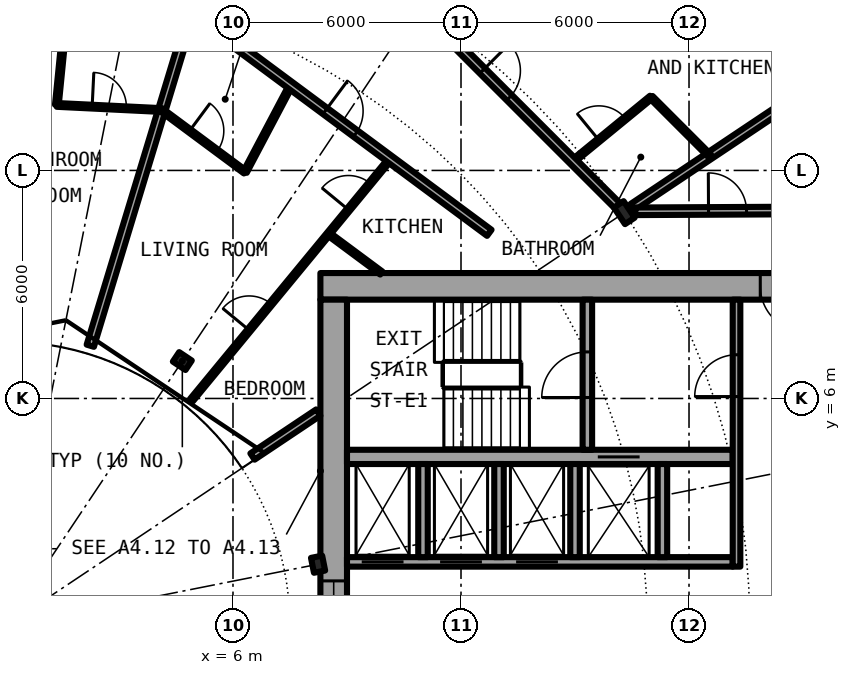
"""IFC4 building model, lengths in metres.
Left out: names, types, materials, properties, quantities, classifications, styles, units other than length and angle.
Written with IfcOpenShell. Run it as: python <this file> out.ifc"""

import sys

from ifc_helpers import new_model, si_unit, direction, frame, frame_2d, origin, origin_2d, place, context, subcontext, project, spatial, rectangle, i_section, extrude, element, fill, save


model = new_model("IFC4")
c1 = context("Model", 3, precision=1e-05, world=origin(), true_north=direction((0.0, 1.0)))
c2 = subcontext(c1, "Body", "Model", "MODEL_VIEW")
j1 = project(units=[si_unit("LENGTHUNIT", "METRE"), si_unit("PLANEANGLEUNIT", "RADIAN")], contexts=[c1])
p1 = place(None, origin())
s1 = spatial("IfcSite", under=j1, at=p1, CompositionType="ELEMENT")
p2 = place(p1, origin())
s2 = spatial("IfcBuilding", under=s1, at=p2, CompositionType="ELEMENT")
p3 = place(p2, frame((0.0, 0.0, 63.6)))
s3 = spatial("IfcBuildingStorey", under=s2, at=p3, CompositionType="ELEMENT", Elevation=63.6)
p4 = place(p3, frame((16.297, 10.889, 0.0), z_axis=(0.0, 0.0, 1.0), x_axis=(0.831469612303, 0.55557023302, 0.0)))
e1 = element("IfcColumn", 1, at=p4, inside=s3, PredefinedType="COLUMN", context=c2, shape_type="SweptSolid", body=[
    extrude(i_section(OverallWidth=0.306, OverallDepth=0.524, WebThickness=0.021, FlangeThickness=0.04, FilletRadius=0.027, at=origin_2d()), origin(), (0.0, 0.0, 1.0), 3.05),
])
for number, where, z_axis, x_axis in (
    (2, (8.239, 1.639, 0.0), (0.0, 0.0, 1.0), (0.981, 0.195, 0.0)),
    (3, (4.667, 6.984, 0.0), (0.0, 0.0, 1.0), (0.556, 0.831, 0.0)),
):
    element("IfcColumn", number, at=place(p3, frame(where, z_axis=z_axis, x_axis=x_axis)), inside=s3, PredefinedType="COLUMN", context=c2, shape_type="SweptSolid", body=[
        extrude(i_section(OverallWidth=0.3, OverallDepth=0.4, WebThickness=0.013, FlangeThickness=0.024, FilletRadius=0.027, at=origin_2d()), origin(), (0.0, 0.0, 1.0), 3.05),
    ])
p5 = place(p3, frame((22.699, 15.167, 0.0), z_axis=(0.0, 0.0, 1.0), x_axis=(-0.634382322723, 0.773019449054, 0.0)))
e4 = element("IfcWall", 4, at=p5, inside=s3, PredefinedType="SOLIDWALL", context=c2, shape_type="SweptSolid", body=[
    extrude(rectangle(XDim=5.352, YDim=0.25, at=frame_2d((2.676, 0.0))), origin(), (0.0, 0.0, 1.0), 2.7),
])
p6 = place(p5, frame((0.841, 0.0, 0.0)))
e5 = element("IfcOpeningElement", 5, at=p6, cuts=e4, PredefinedType="OPENING", context=c2, shape_type="SweptSolid", body=[
    extrude(rectangle(XDim=1.0, YDim=2.2, at=frame_2d((0.5, 1.1))), frame((0.0, 0.135, 0.0), z_axis=(0.0, -1.0, 0.0), x_axis=(1.0, 0.0, 0.0)), (0.0, 0.0, 1.0), 0.27),
])
p7 = place(p5, frame((3.111, 0.0, 0.3)))
e6 = element("IfcOpeningElement", 6, at=p7, cuts=e4, PredefinedType="OPENING", context=c2, shape_type="SweptSolid", body=[
    extrude(rectangle(XDim=1.8, YDim=2.1, at=frame_2d((0.9, 1.05))), frame((0.0, 0.135, 0.0), z_axis=(0.0, -1.0, 0.0), x_axis=(1.0, 0.0, 0.0)), (0.0, 0.0, 1.0), 0.27),
])
p8 = place(p3, frame((22.3, 8.95, 0.0), z_axis=(0.0, 0.0, 1.0), x_axis=(-1.0, 0.0, 0.0)))
e7 = element("IfcWall", 7, at=p8, inside=s3, PredefinedType="SHEAR", context=c2, shape_type="SweptSolid", body=[
    extrude(rectangle(XDim=14.0, YDim=0.7, at=frame_2d((7.0, 0.0))), origin(), (0.0, 0.0, 1.0), 3.05),
])
p9 = place(p8, frame((1.225, 0.0, 0.0)))
e8 = element("IfcOpeningElement", 8, at=p9, cuts=e7, PredefinedType="OPENING", context=c2, shape_type="SweptSolid", body=[
    extrude(rectangle(XDim=1.2, YDim=2.3, at=frame_2d((0.6, 1.15))), frame((0.0, 0.36, 0.0), z_axis=(0.0, -1.0, 0.0), x_axis=(1.0, 0.0, 0.0)), (0.0, 0.0, 1.0), 0.72),
])
p10 = place(p3, frame((8.65, -8.6, 0.0), z_axis=(0.0, 0.0, 1.0), x_axis=(0.0, 1.0, 0.0)))
e9 = element("IfcWall", 9, at=p10, inside=s3, PredefinedType="SHEAR", context=c2, shape_type="SweptSolid", body=[
    extrude(rectangle(XDim=17.2, YDim=0.7, at=frame_2d((8.6, 0.0))), origin(), (0.0, 0.0, 1.0), 3.05),
])
p11 = place(p10, frame((7.4, 0.0, 0.1)))
e10 = element("IfcOpeningElement", 10, at=p11, cuts=e9, PredefinedType="OPENING", context=c2, shape_type="SweptSolid", body=[
    extrude(rectangle(XDim=2.4, YDim=2.2, at=frame_2d((1.2, 1.1))), frame((0.0, 0.36, 0.0), z_axis=(0.0, -1.0, 0.0), x_axis=(1.0, 0.0, 0.0)), (0.0, 0.0, 1.0), 0.72),
])
p12 = place(p3, frame((9.0, 1.7, 0.0), z_axis=(0.0, 0.0, 1.0), x_axis=(1.0, 0.0, 0.0)))
e11 = element("IfcWall", 11, at=p12, inside=s3, PredefinedType="SHEAR", context=c2, shape_type="SweptSolid", body=[
    extrude(rectangle(XDim=10.15, YDim=0.25, at=frame_2d((5.075, 0.0))), origin(), (0.0, 0.0, 1.0), 3.05),
])
p13 = place(p12, frame((0.387, 0.0, 0.0)))
e12 = element("IfcOpeningElement", 12, at=p13, cuts=e11, PredefinedType="OPENING", context=c2, shape_type="SweptSolid", body=[
    extrude(rectangle(XDim=1.1, YDim=2.3, at=frame_2d((0.55, 1.15))), frame((0.0, 0.135, 0.0), z_axis=(0.0, -1.0, 0.0), x_axis=(1.0, 0.0, 0.0)), (0.0, 0.0, 1.0), 0.27),
])
p14 = place(p12, frame((2.45, 0.0, 0.0)))
e13 = element("IfcOpeningElement", 13, at=p14, cuts=e11, PredefinedType="OPENING", context=c2, shape_type="SweptSolid", body=[
    extrude(rectangle(XDim=1.1, YDim=2.3, at=frame_2d((0.55, 1.15))), frame((0.0, 0.135, 0.0), z_axis=(0.0, -1.0, 0.0), x_axis=(1.0, 0.0, 0.0)), (0.0, 0.0, 1.0), 0.27),
])
p15 = place(p12, frame((4.45, 0.0, 0.0)))
e14 = element("IfcOpeningElement", 14, at=p15, cuts=e11, PredefinedType="OPENING", context=c2, shape_type="SweptSolid", body=[
    extrude(rectangle(XDim=1.1, YDim=2.3, at=frame_2d((0.55, 1.15))), frame((0.0, 0.135, 0.0), z_axis=(0.0, -1.0, 0.0), x_axis=(1.0, 0.0, 0.0)), (0.0, 0.0, 1.0), 0.27),
])
p16 = place(p3, frame((9.0, 4.462, 0.0), z_axis=(0.0, 0.0, 1.0), x_axis=(1.0, 0.0, 0.0)))
e15 = element("IfcWall", 15, at=p16, inside=s3, PredefinedType="SHEAR", context=c2, shape_type="SweptSolid", body=[
    extrude(rectangle(XDim=10.15, YDim=0.375, at=frame_2d((5.075, 0.0))), origin(), (0.0, 0.0, 1.0), 3.05),
])
p17 = place(p16, frame((6.6, 0.0, 0.0)))
e16 = element("IfcOpeningElement", 16, at=p17, cuts=e15, PredefinedType="OPENING", context=c2, shape_type="SweptSolid", body=[
    extrude(rectangle(XDim=1.1, YDim=2.3, at=frame_2d((0.55, 1.15))), frame((0.0, 0.198, 0.0), z_axis=(0.0, -1.0, 0.0), x_axis=(1.0, 0.0, 0.0)), (0.0, 0.0, 1.0), 0.395),
])
p18 = place(p3, frame((15.325, 4.65, 0.0), z_axis=(0.0, 0.0, 1.0), x_axis=(0.0, 1.0, 0.0)))
e17 = element("IfcWall", 17, at=p18, inside=s3, PredefinedType="SHEAR", context=c2, shape_type="SweptSolid", body=[
    extrude(rectangle(XDim=3.95, YDim=0.25, at=frame_2d((1.975, 0.0))), origin(), (0.0, 0.0, 1.0), 3.05),
])
p19 = place(p18, frame((1.375, 0.0, 0.0)))
e18 = element("IfcOpeningElement", 18, at=p19, cuts=e17, PredefinedType="OPENING", context=c2, shape_type="SweptSolid", body=[
    extrude(rectangle(XDim=1.2, YDim=2.3, at=frame_2d((0.6, 1.15))), frame((0.0, 0.135, 0.0), z_axis=(0.0, -1.0, 0.0), x_axis=(1.0, 0.0, 0.0)), (0.0, 0.0, 1.0), 0.27),
])
for number, where, z_axis, x_axis in (
    (19, (15.0, 1.825, 0.0), (0.0, 0.0, 1.0), (0.0, 1.0, 0.0)),
    (20, (17.3, 1.825, 0.0), (0.0, 0.0, 1.0), (0.0, 1.0, 0.0)),
):
    element("IfcWall", number, at=place(p3, frame(where, z_axis=z_axis, x_axis=x_axis)), inside=s3, PredefinedType="SOLIDWALL", context=c2, shape_type="SweptSolid", body=[
        extrude(rectangle(XDim=2.45, YDim=0.25, at=frame_2d((1.225, 0.0))), origin(), (0.0, 0.0, 1.0), 2.7),
    ])
p20 = place(p3, frame((19.25, 1.575, 0.0), z_axis=(0.0, 0.0, 1.0), x_axis=(0.0, 1.0, 0.0)))
e21 = element("IfcWall", 21, at=p20, inside=s3, PredefinedType="SOLIDWALL", context=c2, shape_type="SweptSolid", body=[
    extrude(rectangle(XDim=7.025, YDim=0.2, at=frame_2d((3.513, 0.0))), origin(), (0.0, 0.0, 1.0), 2.7),
])
p21 = place(p20, frame((4.475, 0.0, 0.0)))
e22 = element("IfcOpeningElement", 22, at=p21, cuts=e21, PredefinedType="OPENING", context=c2, shape_type="SweptSolid", body=[
    extrude(rectangle(XDim=1.1, YDim=2.3, at=frame_2d((0.55, 1.15))), frame((0.0, 0.11, 0.0), z_axis=(0.0, -1.0, 0.0), x_axis=(1.0, 0.0, 0.0)), (0.0, 0.0, 1.0), 0.22),
])
for number, where, z_axis, x_axis in (
    (23, (11.0, 1.825, 0.0), (0.0, 0.0, 1.0), (0.0, 1.0, 0.0)),
    (24, (13.0, 1.825, 0.0), (0.0, 0.0, 1.0), (0.0, 1.0, 0.0)),
):
    element("IfcWall", number, at=place(p3, frame(where, z_axis=z_axis, x_axis=x_axis)), inside=s3, PredefinedType="SOLIDWALL", context=c2, shape_type="SweptSolid", body=[
        extrude(rectangle(XDim=2.45, YDim=0.25, at=frame_2d((1.225, 0.0))), origin(), (0.0, 0.0, 1.0), 2.7),
    ])
p22 = place(p3, frame((1.365, 13.724, 0.0), z_axis=(0.0, 0.0, 1.0), x_axis=(0.099171803948, 0.995070325807, 0.0)))
e25 = element("IfcWall", 25, at=p22, inside=s3, PredefinedType="PARTITIONING", context=c2, shape_type="SweptSolid", body=[
    extrude(rectangle(XDim=2.622, YDim=0.1, at=frame_2d((1.311, 0.0))), origin(), (0.0, 0.0, 1.0), 2.7),
])
p23 = place(p3, frame((2.245, 7.387, 0.0), z_axis=(0.0, 0.0, 1.0), x_axis=(0.290403763195, 0.956904203315, 0.0)))
e26 = element("IfcWall", 26, at=p23, inside=s3, PredefinedType="PARTITIONING", context=c2, shape_type="SweptSolid", body=[
    extrude(rectangle(XDim=9.179, YDim=0.2, at=frame_2d((4.59, 0.0))), origin(), (0.0, 0.0, 1.0), 2.7),
])
p24 = place(p3, frame((4.909, 5.958, 0.0), z_axis=(0.0, 0.0, 1.0), x_axis=(0.635976043025, 0.771708800454, 0.0)))
e27 = element("IfcWall", 27, at=p24, inside=s3, PredefinedType="PARTITIONING", context=c2, shape_type="SweptSolid", body=[
    extrude(rectangle(XDim=8.213, YDim=0.1, at=frame_2d((4.106, 0.0))), origin(), (0.0, 0.0, 1.0), 2.7),
])
p25 = place(p24, frame((6.49, 0.0, 0.0)))
e28 = element("IfcOpeningElement", 28, at=p25, cuts=e27, PredefinedType="OPENING", context=c2, shape_type="SweptSolid", body=[
    extrude(rectangle(XDim=0.9, YDim=2.3, at=frame_2d((0.45, 1.15))), frame((0.0, 0.06, 0.0), z_axis=(0.0, -1.0, 0.0), x_axis=(1.0, 0.0, 0.0)), (0.0, 0.0, 1.0), 0.12),
])
p26 = place(p24, frame((2.384, 0.0, 0.0)))
e29 = element("IfcOpeningElement", 29, at=p26, cuts=e27, PredefinedType="OPENING", context=c2, shape_type="SweptSolid", body=[
    extrude(rectangle(XDim=0.9, YDim=2.3, at=frame_2d((0.45, 1.15))), frame((0.0, 0.06, 0.0), z_axis=(0.0, -1.0, 0.0), x_axis=(1.0, 0.0, 0.0)), (0.0, 0.0, 1.0), 0.12),
])
p27 = place(p3, frame((6.318, 11.96, 0.0), z_axis=(0.0, 0.0, 1.0), x_axis=(0.467001992543, 0.884256263173, 0.0)))
e30 = element("IfcWall", 30, at=p27, inside=s3, PredefinedType="PARTITIONING", context=c2, shape_type="SweptSolid", body=[
    extrude(rectangle(XDim=2.572, YDim=0.1, at=frame_2d((1.286, 0.0))), origin(), (0.0, 0.0, 1.0), 2.7),
])
p28 = place(p3, frame((14.945, 12.241, 0.0), z_axis=(0.0, 0.0, 1.0), x_axis=(0.77367517848, 0.633582447834, 0.0)))
e31 = element("IfcWall", 31, at=p28, inside=s3, PredefinedType="PARTITIONING", context=c2, shape_type="SweptSolid", body=[
    extrude(rectangle(XDim=2.661, YDim=0.1, at=frame_2d((1.331, 0.0))), origin(), (0.0, 0.0, 1.0), 2.7),
])
p29 = place(p28, frame((0.881, 0.0, 0.0)))
e32 = element("IfcOpeningElement", 32, at=p29, cuts=e31, PredefinedType="OPENING", context=c2, shape_type="SweptSolid", body=[
    extrude(rectangle(XDim=0.9, YDim=2.3, at=frame_2d((0.45, 1.15))), frame((0.0, 0.06, 0.0), z_axis=(0.0, -1.0, 0.0), x_axis=(1.0, 0.0, 0.0)), (0.0, 0.0, 1.0), 0.12),
])
p30 = place(p3, frame((16.515, 11.034, 0.0), z_axis=(0.0, 0.0, 1.0), x_axis=(0.831382022135, 0.555701298605, 0.0)))
e33 = element("IfcWall", 33, at=p30, inside=s3, PredefinedType="PARTITIONING", context=c2, shape_type="SweptSolid", body=[
    extrude(rectangle(XDim=7.313, YDim=0.2, at=frame_2d((3.657, 0.0))), origin(), (0.0, 0.0, 1.0), 2.7),
])
p31 = place(p3, frame((6.513, 4.472, 0.0), z_axis=(0.0, 0.0, 1.0), x_axis=(0.831382204863, 0.555701025225, 0.0)))
e34 = element("IfcWall", 34, at=p31, inside=s3, PredefinedType="PARTITIONING", context=c2, shape_type="SweptSolid", body=[
    extrude(rectangle(XDim=2.082, YDim=0.2, at=frame_2d((1.041, 0.0))), origin(), (0.0, 0.0, 1.0), 2.7),
])
p32 = place(p3, frame((16.588, 10.925, 0.0), z_axis=(0.0, 0.0, 1.0), x_axis=(0.999988019025, 0.004895079807, 0.0)))
e35 = element("IfcWall", 35, at=p32, inside=s3, PredefinedType="PARTITIONING", context=c2, shape_type="SweptSolid", body=[
    extrude(rectangle(XDim=5.087, YDim=0.2, at=frame_2d((2.543, 0.0))), origin(), (0.0, 0.0, 1.0), 2.7),
])
p33 = place(p32, frame((1.925, 0.0, 0.0)))
e36 = element("IfcOpeningElement", 36, at=p33, cuts=e35, PredefinedType="OPENING", context=c2, shape_type="SweptSolid", body=[
    extrude(rectangle(XDim=1.0, YDim=2.3, at=frame_2d((0.5, 1.15))), frame((0.0, 0.11, 0.0), z_axis=(0.0, -1.0, 0.0), x_axis=(1.0, 0.0, 0.0)), (0.0, 0.0, 1.0), 0.22),
])
p34 = place(p3, frame((4.122, 13.589, 0.0), z_axis=(0.0, 0.0, 1.0), x_axis=(0.803128348509, -0.595806055542, 0.0)))
e37 = element("IfcWall", 37, at=p34, inside=s3, PredefinedType="PARTITIONING", context=c2, shape_type="SweptSolid", body=[
    extrude(rectangle(XDim=2.734, YDim=0.1, at=frame_2d((1.367, 0.0))), origin(), (0.0, 0.0, 1.0), 2.7),
])
p35 = place(p34, frame((0.917, 0.0, 0.0)))
e38 = element("IfcOpeningElement", 38, at=p35, cuts=e37, PredefinedType="OPENING", context=c2, shape_type="SweptSolid", body=[
    extrude(rectangle(XDim=0.9, YDim=2.3, at=frame_2d((0.45, 1.15))), frame((0.0, 0.06, 0.0), z_axis=(0.0, -1.0, 0.0), x_axis=(1.0, 0.0, 0.0)), (0.0, 0.0, 1.0), 0.12),
])
p36 = place(p3, frame((8.512, 10.332, 0.0), z_axis=(0.0, 0.0, 1.0), x_axis=(0.803135014325, -0.595797070121, 0.0)))
e39 = element("IfcWall", 39, at=p36, inside=s3, PredefinedType="PARTITIONING", context=c2, shape_type="SweptSolid", body=[
    extrude(rectangle(XDim=1.732, YDim=0.1, at=frame_2d((0.866, 0.0))), origin(), (0.0, 0.0, 1.0), 2.7),
])
p37 = place(p3, frame((1.365, 13.724, 0.0), z_axis=(0.0, 0.0, 1.0), x_axis=(0.99880320044, -0.048909782152, 0.0)))
e40 = element("IfcWall", 40, at=p37, inside=s3, PredefinedType="PARTITIONING", context=c2, shape_type="SweptSolid", body=[
    extrude(rectangle(XDim=2.76, YDim=0.1, at=frame_2d((1.38, 0.0))), origin(), (0.0, 0.0, 1.0), 2.7),
])
p38 = place(p37, frame((0.93, 0.0, 0.0)))
e41 = element("IfcOpeningElement", 41, at=p38, cuts=e40, PredefinedType="OPENING", context=c2, shape_type="SweptSolid", body=[
    extrude(rectangle(XDim=0.9, YDim=2.3, at=frame_2d((0.45, 1.15))), frame((0.0, 0.06, 0.0), z_axis=(0.0, -1.0, 0.0), x_axis=(1.0, 0.0, 0.0)), (0.0, 0.0, 1.0), 0.12),
])
p39 = place(p3, frame((4.906, 16.172, 0.0), z_axis=(0.0, 0.0, 1.0), x_axis=(0.803191461888, -0.595720971219, 0.0)))
e42 = element("IfcWall", 42, at=p39, inside=s3, PredefinedType="PARTITIONING", context=c2, shape_type="SweptSolid", body=[
    extrude(rectangle(XDim=9.76, YDim=0.2, at=frame_2d((4.88, 0.0))), origin(), (0.0, 0.0, 1.0), 2.7),
])
p40 = place(p39, frame((4.38, 0.0, 0.0)))
e43 = element("IfcOpeningElement", 43, at=p40, cuts=e42, PredefinedType="OPENING", context=c2, shape_type="SweptSolid", body=[
    extrude(rectangle(XDim=1.0, YDim=2.3, at=frame_2d((0.5, 1.15))), frame((0.0, 0.11, 0.0), z_axis=(0.0, -1.0, 0.0), x_axis=(1.0, 0.0, 0.0)), (0.0, 0.0, 1.0), 0.22),
])
p41 = place(p3, frame((11.0, 16.186, 0.0), z_axis=(0.0, 0.0, 1.0), x_axis=(0.707106781187, -0.707106781187, 0.0)))
e44 = element("IfcWall", 44, at=p41, inside=s3, PredefinedType="PARTITIONING", context=c2, shape_type="SweptSolid", body=[
    extrude(rectangle(XDim=7.334, YDim=0.2, at=frame_2d((3.667, 0.0))), origin(), (0.0, 0.0, 1.0), 2.38),
])
p42 = place(p41, frame((2.211, 0.0, 0.0)))
e45 = element("IfcOpeningElement", 45, at=p42, cuts=e44, PredefinedType="OPENING", context=c2, shape_type="SweptSolid", body=[
    extrude(rectangle(XDim=1.0, YDim=2.3, at=frame_2d((0.5, 1.15))), frame((0.0, 0.11, 0.0), z_axis=(0.0, -1.0, 0.0), x_axis=(1.0, 0.0, 0.0)), (0.0, 0.0, 1.0), 0.22),
])
p43 = place(p3, frame((17.006, 13.924, 0.0), z_axis=(0.0, 0.0, 1.0), x_axis=(0.706826194425, -0.707387256653, 0.0)))
e46 = element("IfcWall", 46, at=p43, inside=s3, PredefinedType="PARTITIONING", context=c2, shape_type="SweptSolid", body=[
    extrude(rectangle(XDim=2.176, YDim=0.1, at=frame_2d((1.088, 0.0))), origin(), (0.0, 0.0, 1.0), 2.7),
])
p44 = place(p13, origin())
e47 = element("IfcDoor", 47, at=p44, inside=s3, OperationType="DOUBLE_DOOR_SLIDING", PredefinedType="DOOR", context=c2, shape_type="SweptSolid", body=[
    extrude(rectangle(XDim=1.1, YDim=2.3, at=frame_2d((0.55, 1.15))), frame((0.0, 0.025, 0.0), z_axis=(0.0, -1.0, 0.0), x_axis=(1.0, 0.0, 0.0)), (0.0, 0.0, 1.0), 0.05),
])
fill(e12, e47)
p45 = place(p14, origin())
e48 = element("IfcDoor", 48, at=p45, inside=s3, OperationType="DOUBLE_DOOR_SLIDING", PredefinedType="DOOR", context=c2, shape_type="SweptSolid", body=[
    extrude(rectangle(XDim=1.1, YDim=2.3, at=frame_2d((0.55, 1.15))), frame((0.0, 0.025, 0.0), z_axis=(0.0, -1.0, 0.0), x_axis=(1.0, 0.0, 0.0)), (0.0, 0.0, 1.0), 0.05),
])
fill(e13, e48)
p46 = place(p15, origin())
e49 = element("IfcDoor", 49, at=p46, inside=s3, OperationType="DOUBLE_DOOR_SLIDING", PredefinedType="DOOR", context=c2, shape_type="SweptSolid", body=[
    extrude(rectangle(XDim=1.1, YDim=2.3, at=frame_2d((0.55, 1.15))), frame((0.0, 0.025, 0.0), z_axis=(0.0, -1.0, 0.0), x_axis=(1.0, 0.0, 0.0)), (0.0, 0.0, 1.0), 0.05),
])
fill(e14, e49)
p47 = place(p17, origin())
e50 = element("IfcDoor", 50, at=p47, inside=s3, OperationType="DOUBLE_DOOR_SLIDING", PredefinedType="DOOR", context=c2, shape_type="SweptSolid", body=[
    extrude(rectangle(XDim=1.1, YDim=2.3, at=frame_2d((0.55, 1.15))), frame((0.0, 0.025, 0.0), z_axis=(0.0, -1.0, 0.0), x_axis=(1.0, 0.0, 0.0)), (0.0, 0.0, 1.0), 0.05),
])
fill(e16, e50)
p48 = place(p19, origin())
e51 = element("IfcDoor", 51, at=p48, inside=s3, OperationType="SINGLE_SWING_LEFT", PredefinedType="DOOR", context=c2, shape_type="SweptSolid", body=[
    extrude(rectangle(XDim=1.2, YDim=2.3, at=frame_2d((0.6, 1.15))), frame((0.0, 0.025, 0.0), z_axis=(0.0, -1.0, 0.0), x_axis=(1.0, 0.0, 0.0)), (0.0, 0.0, 1.0), 0.05),
])
fill(e18, e51)
p49 = place(p21, origin())
e52 = element("IfcDoor", 52, at=p49, inside=s3, OperationType="SINGLE_SWING_LEFT", PredefinedType="DOOR", context=c2, shape_type="SweptSolid", body=[
    extrude(rectangle(XDim=1.1, YDim=2.3, at=frame_2d((0.55, 1.15))), frame((0.0, 0.025, 0.0), z_axis=(0.0, -1.0, 0.0), x_axis=(1.0, 0.0, 0.0)), (0.0, 0.0, 1.0), 0.05),
])
fill(e22, e52)
p50 = place(p9, origin())
e53 = element("IfcDoor", 53, at=p50, inside=s3, OperationType="SINGLE_SWING_RIGHT", PredefinedType="DOOR", context=c2, shape_type="SweptSolid", body=[
    extrude(rectangle(XDim=1.2, YDim=2.3, at=frame_2d((0.6, 1.15))), frame((0.0, 0.025, 0.0), z_axis=(0.0, -1.0, 0.0), x_axis=(1.0, 0.0, 0.0)), (0.0, 0.0, 1.0), 0.05),
])
fill(e8, e53)
p51 = place(p11, origin())
e54 = element("IfcWindow", 54, at=p51, inside=s3, PartitioningType="SINGLE_PANEL", PredefinedType="WINDOW", context=c2, shape_type="SweptSolid", body=[
    extrude(rectangle(XDim=2.4, YDim=2.2, at=frame_2d((1.2, 1.1))), frame((0.0, 0.03, 0.0), z_axis=(0.0, -1.0, 0.0), x_axis=(1.0, 0.0, 0.0)), (0.0, 0.0, 1.0), 0.06),
])
fill(e10, e54)
p52 = place(p42, origin())
e55 = element("IfcDoor", 55, at=p52, inside=s3, OperationType="SINGLE_SWING_LEFT", PredefinedType="DOOR", context=c2, shape_type="SweptSolid", body=[
    extrude(rectangle(XDim=1.0, YDim=2.3, at=frame_2d((0.5, 1.15))), frame((0.0, 0.025, 0.0), z_axis=(0.0, -1.0, 0.0), x_axis=(1.0, 0.0, 0.0)), (0.0, 0.0, 1.0), 0.05),
])
fill(e45, e55)
p53 = place(p29, origin())
e56 = element("IfcDoor", 56, at=p53, inside=s3, OperationType="SINGLE_SWING_LEFT", PredefinedType="DOOR", context=c2, shape_type="SweptSolid", body=[
    extrude(rectangle(XDim=0.9, YDim=2.3, at=frame_2d((0.45, 1.15))), frame((0.0, 0.025, 0.0), z_axis=(0.0, -1.0, 0.0), x_axis=(1.0, 0.0, 0.0)), (0.0, 0.0, 1.0), 0.05),
])
fill(e32, e56)
p54 = place(p40, origin())
e57 = element("IfcDoor", 57, at=p54, inside=s3, OperationType="SINGLE_SWING_LEFT", PredefinedType="DOOR", context=c2, shape_type="SweptSolid", body=[
    extrude(rectangle(XDim=1.0, YDim=2.3, at=frame_2d((0.5, 1.15))), frame((0.0, 0.025, 0.0), z_axis=(0.0, -1.0, 0.0), x_axis=(1.0, 0.0, 0.0)), (0.0, 0.0, 1.0), 0.05),
])
fill(e43, e57)
p55 = place(p35, origin())
e58 = element("IfcDoor", 58, at=p55, inside=s3, OperationType="SINGLE_SWING_LEFT", PredefinedType="DOOR", context=c2, shape_type="SweptSolid", body=[
    extrude(rectangle(XDim=0.9, YDim=2.3, at=frame_2d((0.45, 1.15))), frame((0.0, 0.025, 0.0), z_axis=(0.0, -1.0, 0.0), x_axis=(1.0, 0.0, 0.0)), (0.0, 0.0, 1.0), 0.05),
])
fill(e38, e58)
p56 = place(p25, origin())
e59 = element("IfcDoor", 59, at=p56, inside=s3, OperationType="SINGLE_SWING_RIGHT", PredefinedType="DOOR", context=c2, shape_type="SweptSolid", body=[
    extrude(rectangle(XDim=0.9, YDim=2.3, at=frame_2d((0.45, 1.15))), frame((0.0, 0.025, 0.0), z_axis=(0.0, -1.0, 0.0), x_axis=(1.0, 0.0, 0.0)), (0.0, 0.0, 1.0), 0.05),
])
fill(e28, e59)
p57 = place(p26, origin())
e60 = element("IfcDoor", 60, at=p57, inside=s3, OperationType="SINGLE_SWING_LEFT", PredefinedType="DOOR", context=c2, shape_type="SweptSolid", body=[
    extrude(rectangle(XDim=0.9, YDim=2.3, at=frame_2d((0.45, 1.15))), frame((0.0, 0.025, 0.0), z_axis=(0.0, -1.0, 0.0), x_axis=(1.0, 0.0, 0.0)), (0.0, 0.0, 1.0), 0.05),
])
fill(e29, e60)
p58 = place(p38, origin())
e61 = element("IfcDoor", 61, at=p58, inside=s3, OperationType="SINGLE_SWING_LEFT", PredefinedType="DOOR", context=c2, shape_type="SweptSolid", body=[
    extrude(rectangle(XDim=0.9, YDim=2.3, at=frame_2d((0.45, 1.15))), frame((0.0, 0.025, 0.0), z_axis=(0.0, -1.0, 0.0), x_axis=(1.0, 0.0, 0.0)), (0.0, 0.0, 1.0), 0.05),
])
fill(e41, e61)
p59 = place(p33, origin())
e62 = element("IfcDoor", 62, at=p59, inside=s3, OperationType="SINGLE_SWING_LEFT", PredefinedType="DOOR", context=c2, shape_type="SweptSolid", body=[
    extrude(rectangle(XDim=1.0, YDim=2.3, at=frame_2d((0.5, 1.15))), frame((0.0, 0.025, 0.0), z_axis=(0.0, -1.0, 0.0), x_axis=(1.0, 0.0, 0.0)), (0.0, 0.0, 1.0), 0.05),
])
fill(e36, e62)
save(model, sys.argv[1])
